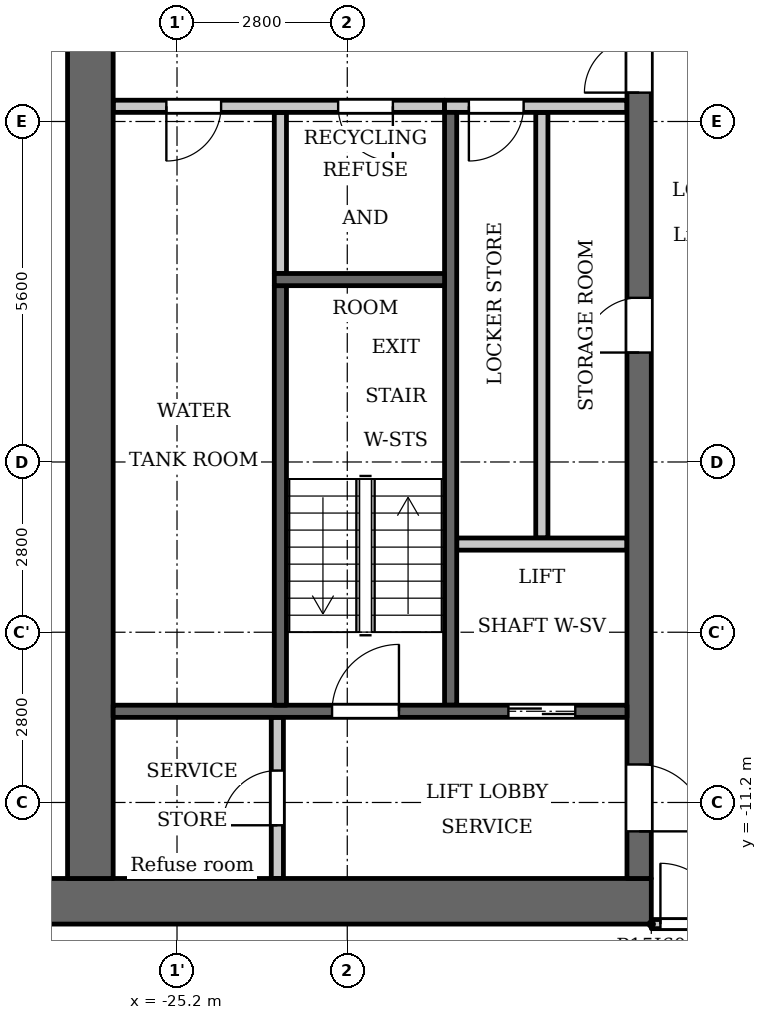
"""IFC4 building model, lengths in metres.
Left out: names, types, materials, properties, quantities, classifications, styles, units other than length and angle.
Written with IfcOpenShell. Run it as: python <this file> out.ifc"""

import sys

from ifc_helpers import new_model, si_unit, direction, frame, frame_2d, origin, place, context, subcontext, project, spatial, rectangle, extrude, element, fill, save


model = new_model("IFC4")
c1 = context("Model", 3, precision=1e-05, world=origin(), true_north=direction((0.0, 1.0)))
c2 = subcontext(c1, "Body", "Model", "MODEL_VIEW")
j1 = project(units=[si_unit("LENGTHUNIT", "METRE"), si_unit("PLANEANGLEUNIT", "RADIAN")], contexts=[c1])
p1 = place(None, origin())
s1 = spatial("IfcSite", under=j1, at=p1, CompositionType="ELEMENT")
p2 = place(p1, origin())
s2 = spatial("IfcBuilding", under=s1, at=p2, CompositionType="ELEMENT")
p3 = place(p2, frame((0.0, 0.0, 136.1)))
s3 = spatial("IfcBuildingStorey", under=s2, at=p3, CompositionType="ELEMENT", Elevation=136.1)
p4 = place(p3, frame((-23.5, -2.5, 0.0), z_axis=(0.0, 0.0, 1.0), x_axis=(0.0, 1.0, 0.0)))
e1 = element("IfcWall", 1, at=p4, inside=s3, PredefinedType="PARTITIONING", context=c2, shape_type="SweptSolid", body=[
    extrude(rectangle(XDim=2.65, YDim=0.2, at=frame_2d((1.325, 0.0))), origin(), (0.0, 0.0, 1.0), 3.2),
])
p5 = place(p3, frame((-20.7, -9.6, 0.0), z_axis=(0.0, 0.0, 1.0), x_axis=(0.0, 1.0, 0.0)))
e2 = element("IfcWall", 2, at=p5, inside=s3, PredefinedType="SHEAR", context=c2, shape_type="SweptSolid", body=[
    extrude(rectangle(XDim=9.75, YDim=0.2, at=frame_2d((4.875, 0.0))), origin(), (0.0, 0.0, 1.0), 3.2),
])
p6 = place(p3, frame((-20.8, 0.25, 0.0), z_axis=(0.0, 0.0, 1.0), x_axis=(-1.0, 0.0, 0.0)))
e3 = element("IfcWall", 3, at=p6, inside=s3, PredefinedType="PARTITIONING", context=c2, shape_type="SweptSolid", body=[
    extrude(rectangle(XDim=5.45, YDim=0.2, at=frame_2d((2.725, 0.0))), origin(), (0.0, 0.0, 1.0), 3.2),
])
p7 = place(p6, frame((0.85, 0.0, 0.0)))
e4 = element("IfcOpeningElement", 4, at=p7, cuts=e3, PredefinedType="OPENING", context=c2, shape_type="SweptSolid", body=[
    extrude(rectangle(XDim=0.9, YDim=2.1, at=frame_2d((0.45, 1.05))), frame((0.0, 0.11, 0.0), z_axis=(0.0, -1.0, 0.0), x_axis=(1.0, 0.0, 0.0)), (0.0, 0.0, 1.0), 0.22),
])
p8 = place(p6, frame((3.675, 0.0, 0.0)))
e5 = element("IfcOpeningElement", 5, at=p8, cuts=e3, PredefinedType="OPENING", context=c2, shape_type="SweptSolid", body=[
    extrude(rectangle(XDim=0.9, YDim=2.1, at=frame_2d((0.45, 1.05))), frame((0.0, 0.11, 0.0), z_axis=(0.0, -1.0, 0.0), x_axis=(1.0, 0.0, 0.0)), (0.0, 0.0, 1.0), 0.22),
])
p9 = place(p3, frame((-17.4, -12.825, 0.0), z_axis=(0.0, 0.0, 1.0), x_axis=(-1.0, 0.0, 0.0)))
e6 = element("IfcWall", 6, at=p9, inside=s3, PredefinedType="SHEAR", context=c2, shape_type="SweptSolid", body=[
    extrude(rectangle(XDim=10.4, YDim=0.75, at=frame_2d((5.2, 0.0))), origin(), (0.0, 0.0, 1.0), 3.2),
])
p10 = place(p3, frame((-19.2, -6.85, 0.0), z_axis=(0.0, 0.0, 1.0), x_axis=(0.0, 1.0, 0.0)))
e7 = element("IfcWall", 7, at=p10, inside=s3, PredefinedType="PARTITIONING", context=c2, shape_type="SweptSolid", body=[
    extrude(rectangle(XDim=7.0, YDim=0.2, at=frame_2d((3.5, 0.0))), origin(), (0.0, 0.0, 1.0), 3.2),
])
p11 = place(p3, frame((-17.6, -12.45, 0.0), z_axis=(0.0, 0.0, 1.0), x_axis=(0.0, 1.0, 0.0)))
e8 = element("IfcWall", 8, at=p11, inside=s3, PredefinedType="SHEAR", context=c2, shape_type="SweptSolid", body=[
    extrude(rectangle(XDim=24.9, YDim=0.4, at=frame_2d((12.45, 0.0))), origin(), (0.0, 0.0, 1.0), 3.2),
])
p12 = place(p11, frame((8.65, 0.0, 0.0)))
e9 = element("IfcOpeningElement", 9, at=p12, cuts=e8, PredefinedType="OPENING", context=c2, shape_type="SweptSolid", body=[
    extrude(rectangle(XDim=0.9, YDim=2.1, at=frame_2d((0.45, 1.05))), frame((0.0, 0.21, 0.0), z_axis=(0.0, -1.0, 0.0), x_axis=(1.0, 0.0, 0.0)), (0.0, 0.0, 1.0), 0.42),
])
p13 = place(p11, frame((15.6, 0.0, 0.0)))
e10 = element("IfcOpeningElement", 10, at=p13, cuts=e8, PredefinedType="OPENING", context=c2, shape_type="SweptSolid", body=[
    extrude(rectangle(XDim=1.1, YDim=2.1, at=frame_2d((0.55, 1.05))), frame((0.0, 0.21, 0.0), z_axis=(0.0, -1.0, 0.0), x_axis=(1.0, 0.0, 0.0)), (0.0, 0.0, 1.0), 0.42),
])
p14 = place(p11, frame((18.0, 0.0, 0.0)))
e11 = element("IfcOpeningElement", 11, at=p14, cuts=e8, PredefinedType="OPENING", context=c2, shape_type="SweptSolid", body=[
    extrude(rectangle(XDim=1.1, YDim=2.1, at=frame_2d((0.55, 1.05))), frame((0.0, 0.21, 0.0), z_axis=(0.0, -1.0, 0.0), x_axis=(1.0, 0.0, 0.0)), (0.0, 0.0, 1.0), 0.42),
])
p15 = place(p11, frame((23.025, 0.0, 0.0)))
e12 = element("IfcOpeningElement", 12, at=p15, cuts=e8, PredefinedType="OPENING", context=c2, shape_type="SweptSolid", body=[
    extrude(rectangle(XDim=1.1, YDim=2.1, at=frame_2d((0.55, 1.05))), frame((0.0, 0.21, 0.0), z_axis=(0.0, -1.0, 0.0), x_axis=(1.0, 0.0, 0.0)), (0.0, 0.0, 1.0), 0.42),
])
p16 = place(p11, frame((0.775, 0.0, 0.0)))
e13 = element("IfcOpeningElement", 13, at=p16, cuts=e8, PredefinedType="OPENING", context=c2, shape_type="SweptSolid", body=[
    extrude(rectangle(XDim=1.1, YDim=2.1, at=frame_2d((0.55, 1.05))), frame((0.0, 0.21, 0.0), z_axis=(0.0, -1.0, 0.0), x_axis=(1.0, 0.0, 0.0)), (0.0, 0.0, 1.0), 0.42),
])
p17 = place(p11, frame((12.925, 0.0, 0.0)))
e14 = element("IfcOpeningElement", 14, at=p17, cuts=e8, PredefinedType="OPENING", context=c2, shape_type="SweptSolid", body=[
    extrude(rectangle(XDim=1.8, YDim=2.1, at=frame_2d((0.9, 1.05))), frame((0.0, 0.21, 0.0), z_axis=(0.0, -1.0, 0.0), x_axis=(1.0, 0.0, 0.0)), (0.0, 0.0, 1.0), 0.42),
])
p18 = place(p3, frame((-26.625, -12.45, 0.0), z_axis=(0.0, 0.0, 1.0), x_axis=(0.0, 1.0, 0.0)))
e15 = element("IfcWall", 15, at=p18, inside=s3, PredefinedType="SHEAR", context=c2, shape_type="SweptSolid", body=[
    extrude(rectangle(XDim=24.9, YDim=0.75, at=frame_2d((12.45, 0.0))), origin(), (0.0, 0.0, 1.0), 3.2),
])
p19 = place(p3, frame((-23.55, -12.45, 0.0), z_axis=(0.0, 0.0, 1.0), x_axis=(0.0, 1.0, 0.0)))
e16 = element("IfcWall", 16, at=p19, inside=s3, PredefinedType="PARTITIONING", context=c2, shape_type="SweptSolid", body=[
    extrude(rectangle(XDim=2.65, YDim=0.2, at=frame_2d((1.325, 0.0))), origin(), (0.0, 0.0, 1.0), 3.2),
])
p20 = place(p19, frame((0.875, 0.0, 0.0)))
e17 = element("IfcOpeningElement", 17, at=p20, cuts=e16, PredefinedType="OPENING", context=c2, shape_type="SweptSolid", body=[
    extrude(rectangle(XDim=0.9, YDim=2.1, at=frame_2d((0.45, 1.05))), frame((0.0, 0.11, 0.0), z_axis=(0.0, -1.0, 0.0), x_axis=(1.0, 0.0, 0.0)), (0.0, 0.0, 1.0), 0.22),
])
p21 = place(p3, frame((-17.8, -9.7, 0.0), z_axis=(0.0, 0.0, 1.0), x_axis=(-1.0, 0.0, 0.0)))
e18 = element("IfcWall", 18, at=p21, inside=s3, PredefinedType="SHEAR", context=c2, shape_type="SweptSolid", body=[
    extrude(rectangle(XDim=8.45, YDim=0.2, at=frame_2d((4.225, 0.0))), origin(), (0.0, 0.0, 1.0), 3.2),
])
p22 = place(p21, frame((0.85, 0.0, 0.0)))
e19 = element("IfcOpeningElement", 19, at=p22, cuts=e18, PredefinedType="OPENING", context=c2, shape_type="SweptSolid", body=[
    extrude(rectangle(XDim=1.1, YDim=2.1, at=frame_2d((0.55, 1.05))), frame((0.0, 0.11, 0.0), z_axis=(0.0, -1.0, 0.0), x_axis=(1.0, 0.0, 0.0)), (0.0, 0.0, 1.0), 0.22),
])
p23 = place(p21, frame((3.75, 0.0, 0.0)))
e20 = element("IfcOpeningElement", 20, at=p23, cuts=e18, PredefinedType="OPENING", context=c2, shape_type="SweptSolid", body=[
    extrude(rectangle(XDim=1.1, YDim=2.1, at=frame_2d((0.55, 1.05))), frame((0.0, 0.11, 0.0), z_axis=(0.0, -1.0, 0.0), x_axis=(1.0, 0.0, 0.0)), (0.0, 0.0, 1.0), 0.22),
])
p24 = place(p3, frame((-17.8, -6.95, 0.0), z_axis=(0.0, 0.0, 1.0), x_axis=(-1.0, 0.0, 0.0)))
e21 = element("IfcWall", 21, at=p24, inside=s3, PredefinedType="PARTITIONING", context=c2, shape_type="SweptSolid", body=[
    extrude(rectangle(XDim=2.8, YDim=0.2, at=frame_2d((1.4, 0.0))), origin(), (0.0, 0.0, 1.0), 3.2),
])
p25 = place(p3, frame((-17.8, 0.25, 0.0), z_axis=(0.0, 0.0, 1.0), x_axis=(-1.0, 0.0, 0.0)))
e22 = element("IfcWall", 22, at=p25, inside=s3, PredefinedType="PARTITIONING", context=c2, shape_type="SweptSolid", body=[
    extrude(rectangle(XDim=3.0, YDim=0.2, at=frame_2d((1.5, 0.0))), origin(), (0.0, 0.0, 1.0), 3.2),
])
p26 = place(p25, frame((1.7, 0.0, 0.0)))
e23 = element("IfcOpeningElement", 23, at=p26, cuts=e22, PredefinedType="OPENING", context=c2, shape_type="SweptSolid", body=[
    extrude(rectangle(XDim=0.9, YDim=2.1, at=frame_2d((0.45, 1.05))), frame((0.0, 0.11, 0.0), z_axis=(0.0, -1.0, 0.0), x_axis=(1.0, 0.0, 0.0)), (0.0, 0.0, 1.0), 0.22),
])
p27 = place(p3, frame((-23.5, -9.6, 0.0), z_axis=(0.0, 0.0, 1.0), x_axis=(0.0, 1.0, 0.0)))
e24 = element("IfcWall", 24, at=p27, inside=s3, PredefinedType="SHEAR", context=c2, shape_type="SweptSolid", body=[
    extrude(rectangle(XDim=6.9, YDim=0.2, at=frame_2d((3.45, 0.0))), origin(), (0.0, 0.0, 1.0), 3.2),
])
p28 = place(p3, frame((-20.8, -2.6, 0.0), z_axis=(0.0, 0.0, 1.0), x_axis=(-1.0, 0.0, 0.0)))
e25 = element("IfcWall", 25, at=p28, inside=s3, PredefinedType="SHEAR", context=c2, shape_type="SweptSolid", body=[
    extrude(rectangle(XDim=2.8, YDim=0.2, at=frame_2d((1.4, 0.0))), origin(), (0.0, 0.0, 1.0), 3.2),
])
p29 = place(p3, frame((-17.4, -13.2, 0.0), z_axis=(0.0, 0.0, 1.0), x_axis=(1.0, 0.0, 0.0)))
e26 = element("IfcWall", 26, at=p29, inside=s3, PredefinedType="PARTITIONING", context=c2, shape_type="SweptSolid", body=[
    extrude(rectangle(XDim=34.8, YDim=0.15, at=frame_2d((17.4, 0.0))), origin(), (0.0, 0.0, 1.0), 3.2),
])
p30 = place(p29, frame((0.15, 0.0, 0.0)))
e27 = element("IfcOpeningElement", 27, at=p30, cuts=e26, PredefinedType="OPENING", context=c2, shape_type="SweptSolid", body=[
    extrude(rectangle(XDim=1.0, YDim=2.1, at=frame_2d((0.5, 1.05))), frame((0.0, 0.085, 0.0), z_axis=(0.0, -1.0, 0.0), x_axis=(1.0, 0.0, 0.0)), (0.0, 0.0, 1.0), 0.17),
])
p31 = place(p29, frame((33.55, 0.0, 0.0)))
e28 = element("IfcOpeningElement", 28, at=p31, cuts=e26, PredefinedType="OPENING", context=c2, shape_type="SweptSolid", body=[
    extrude(rectangle(XDim=1.0, YDim=2.1, at=frame_2d((0.5, 1.05))), frame((0.0, 0.085, 0.0), z_axis=(0.0, -1.0, 0.0), x_axis=(1.0, 0.0, 0.0)), (0.0, 0.0, 1.0), 0.17),
])
p32 = place(p29, frame((6.85, 0.0, 0.0)))
e29 = element("IfcOpeningElement", 29, at=p32, cuts=e26, PredefinedType="OPENING", context=c2, shape_type="SweptSolid", body=[
    extrude(rectangle(XDim=1.0, YDim=2.1, at=frame_2d((0.5, 1.05))), frame((0.0, 0.085, 0.0), z_axis=(0.0, -1.0, 0.0), x_axis=(1.0, 0.0, 0.0)), (0.0, 0.0, 1.0), 0.17),
])
p33 = place(p29, frame((12.45, 0.0, 0.0)))
e30 = element("IfcOpeningElement", 30, at=p33, cuts=e26, PredefinedType="OPENING", context=c2, shape_type="SweptSolid", body=[
    extrude(rectangle(XDim=1.0, YDim=2.1, at=frame_2d((0.5, 1.05))), frame((0.0, 0.085, 0.0), z_axis=(0.0, -1.0, 0.0), x_axis=(1.0, 0.0, 0.0)), (0.0, 0.0, 1.0), 0.17),
])
p34 = place(p29, frame((21.3, 0.0, 0.0)))
e31 = element("IfcOpeningElement", 31, at=p34, cuts=e26, PredefinedType="OPENING", context=c2, shape_type="SweptSolid", body=[
    extrude(rectangle(XDim=1.0, YDim=2.1, at=frame_2d((0.5, 1.05))), frame((0.0, 0.085, 0.0), z_axis=(0.0, -1.0, 0.0), x_axis=(1.0, 0.0, 0.0)), (0.0, 0.0, 1.0), 0.17),
])
p35 = place(p29, frame((26.9, 0.0, 0.0)))
e32 = element("IfcOpeningElement", 32, at=p35, cuts=e26, PredefinedType="OPENING", context=c2, shape_type="SweptSolid", body=[
    extrude(rectangle(XDim=1.0, YDim=2.1, at=frame_2d((0.5, 1.05))), frame((0.0, 0.085, 0.0), z_axis=(0.0, -1.0, 0.0), x_axis=(1.0, 0.0, 0.0)), (0.0, 0.0, 1.0), 0.17),
])
p36 = place(p22, origin())
e33 = element("IfcDoor", 33, at=p36, inside=s3, OperationType="DOUBLE_DOOR_SLIDING", PredefinedType="DOOR", context=c2, shape_type="SweptSolid", body=[
    extrude(rectangle(XDim=1.1, YDim=2.1, at=frame_2d((0.55, 1.05))), frame((0.0, 0.025, 0.0), z_axis=(0.0, -1.0, 0.0), x_axis=(1.0, 0.0, 0.0)), (0.0, 0.0, 1.0), 0.05),
])
fill(e19, e33)
p37 = place(p12, origin())
e34 = element("IfcDoor", 34, at=p37, inside=s3, OperationType="SINGLE_SWING_RIGHT", PredefinedType="DOOR", context=c2, shape_type="SweptSolid", body=[
    extrude(rectangle(XDim=0.9, YDim=2.1, at=frame_2d((0.45, 1.05))), frame((0.0, 0.025, 0.0), z_axis=(0.0, -1.0, 0.0), x_axis=(1.0, 0.0, 0.0)), (0.0, 0.0, 1.0), 0.05),
])
fill(e9, e34)
p38 = place(p26, origin())
e35 = element("IfcDoor", 35, at=p38, inside=s3, OperationType="SINGLE_SWING_LEFT", PredefinedType="DOOR", context=c2, shape_type="SweptSolid", body=[
    extrude(rectangle(XDim=0.9, YDim=2.1, at=frame_2d((0.45, 1.05))), frame((0.0, 0.025, 0.0), z_axis=(0.0, -1.0, 0.0), x_axis=(1.0, 0.0, 0.0)), (0.0, 0.0, 1.0), 0.05),
])
fill(e23, e35)
p39 = place(p16, origin())
e36 = element("IfcDoor", 36, at=p39, inside=s3, OperationType="SINGLE_SWING_LEFT", PredefinedType="DOOR", context=c2, shape_type="SweptSolid", body=[
    extrude(rectangle(XDim=1.1, YDim=2.1, at=frame_2d((0.55, 1.05))), frame((0.0, 0.025, 0.0), z_axis=(0.0, -1.0, 0.0), x_axis=(1.0, 0.0, 0.0)), (0.0, 0.0, 1.0), 0.05),
])
fill(e13, e36)
p40 = place(p20, origin())
e37 = element("IfcDoor", 37, at=p40, inside=s3, OperationType="SINGLE_SWING_RIGHT", PredefinedType="DOOR", context=c2, shape_type="SweptSolid", body=[
    extrude(rectangle(XDim=0.9, YDim=2.1, at=frame_2d((0.45, 1.05))), frame((0.0, 0.025, 0.0), z_axis=(0.0, -1.0, 0.0), x_axis=(1.0, 0.0, 0.0)), (0.0, 0.0, 1.0), 0.05),
])
fill(e17, e37)
p41 = place(p23, origin())
e38 = element("IfcDoor", 38, at=p41, inside=s3, OperationType="SINGLE_SWING_LEFT", PredefinedType="DOOR", context=c2, shape_type="SweptSolid", body=[
    extrude(rectangle(XDim=1.1, YDim=2.1, at=frame_2d((0.55, 1.05))), frame((0.0, 0.025, 0.0), z_axis=(0.0, -1.0, 0.0), x_axis=(1.0, 0.0, 0.0)), (0.0, 0.0, 1.0), 0.05),
])
fill(e20, e38)
p42 = place(p17, origin())
e39 = element("IfcDoor", 39, at=p42, inside=s3, OperationType="DOUBLE_DOOR_SINGLE_SWING", PredefinedType="DOOR", context=c2, shape_type="SweptSolid", body=[
    extrude(rectangle(XDim=1.8, YDim=2.1, at=frame_2d((0.9, 1.05))), frame((0.0, 0.025, 0.0), z_axis=(0.0, -1.0, 0.0), x_axis=(1.0, 0.0, 0.0)), (0.0, 0.0, 1.0), 0.05),
])
fill(e14, e39)
p43 = place(p7, origin())
e40 = element("IfcDoor", 40, at=p43, inside=s3, OperationType="SINGLE_SWING_RIGHT", PredefinedType="DOOR", context=c2, shape_type="SweptSolid", body=[
    extrude(rectangle(XDim=0.9, YDim=2.1, at=frame_2d((0.45, 1.05))), frame((0.0, 0.025, 0.0), z_axis=(0.0, -1.0, 0.0), x_axis=(1.0, 0.0, 0.0)), (0.0, 0.0, 1.0), 0.05),
])
fill(e4, e40)
p44 = place(p8, origin())
e41 = element("IfcDoor", 41, at=p44, inside=s3, OperationType="SINGLE_SWING_LEFT", PredefinedType="DOOR", context=c2, shape_type="SweptSolid", body=[
    extrude(rectangle(XDim=0.9, YDim=2.1, at=frame_2d((0.45, 1.05))), frame((0.0, 0.025, 0.0), z_axis=(0.0, -1.0, 0.0), x_axis=(1.0, 0.0, 0.0)), (0.0, 0.0, 1.0), 0.05),
])
fill(e5, e41)
p45 = place(p30, origin())
e42 = element("IfcDoor", 42, at=p45, inside=s3, OperationType="SINGLE_SWING_RIGHT", PredefinedType="DOOR", context=c2, shape_type="SweptSolid", body=[
    extrude(rectangle(XDim=1.0, YDim=2.1, at=frame_2d((0.5, 1.05))), frame((0.0, 0.025, 0.0), z_axis=(0.0, -1.0, 0.0), x_axis=(1.0, 0.0, 0.0)), (0.0, 0.0, 1.0), 0.05),
])
fill(e27, e42)
save(model, sys.argv[1])
